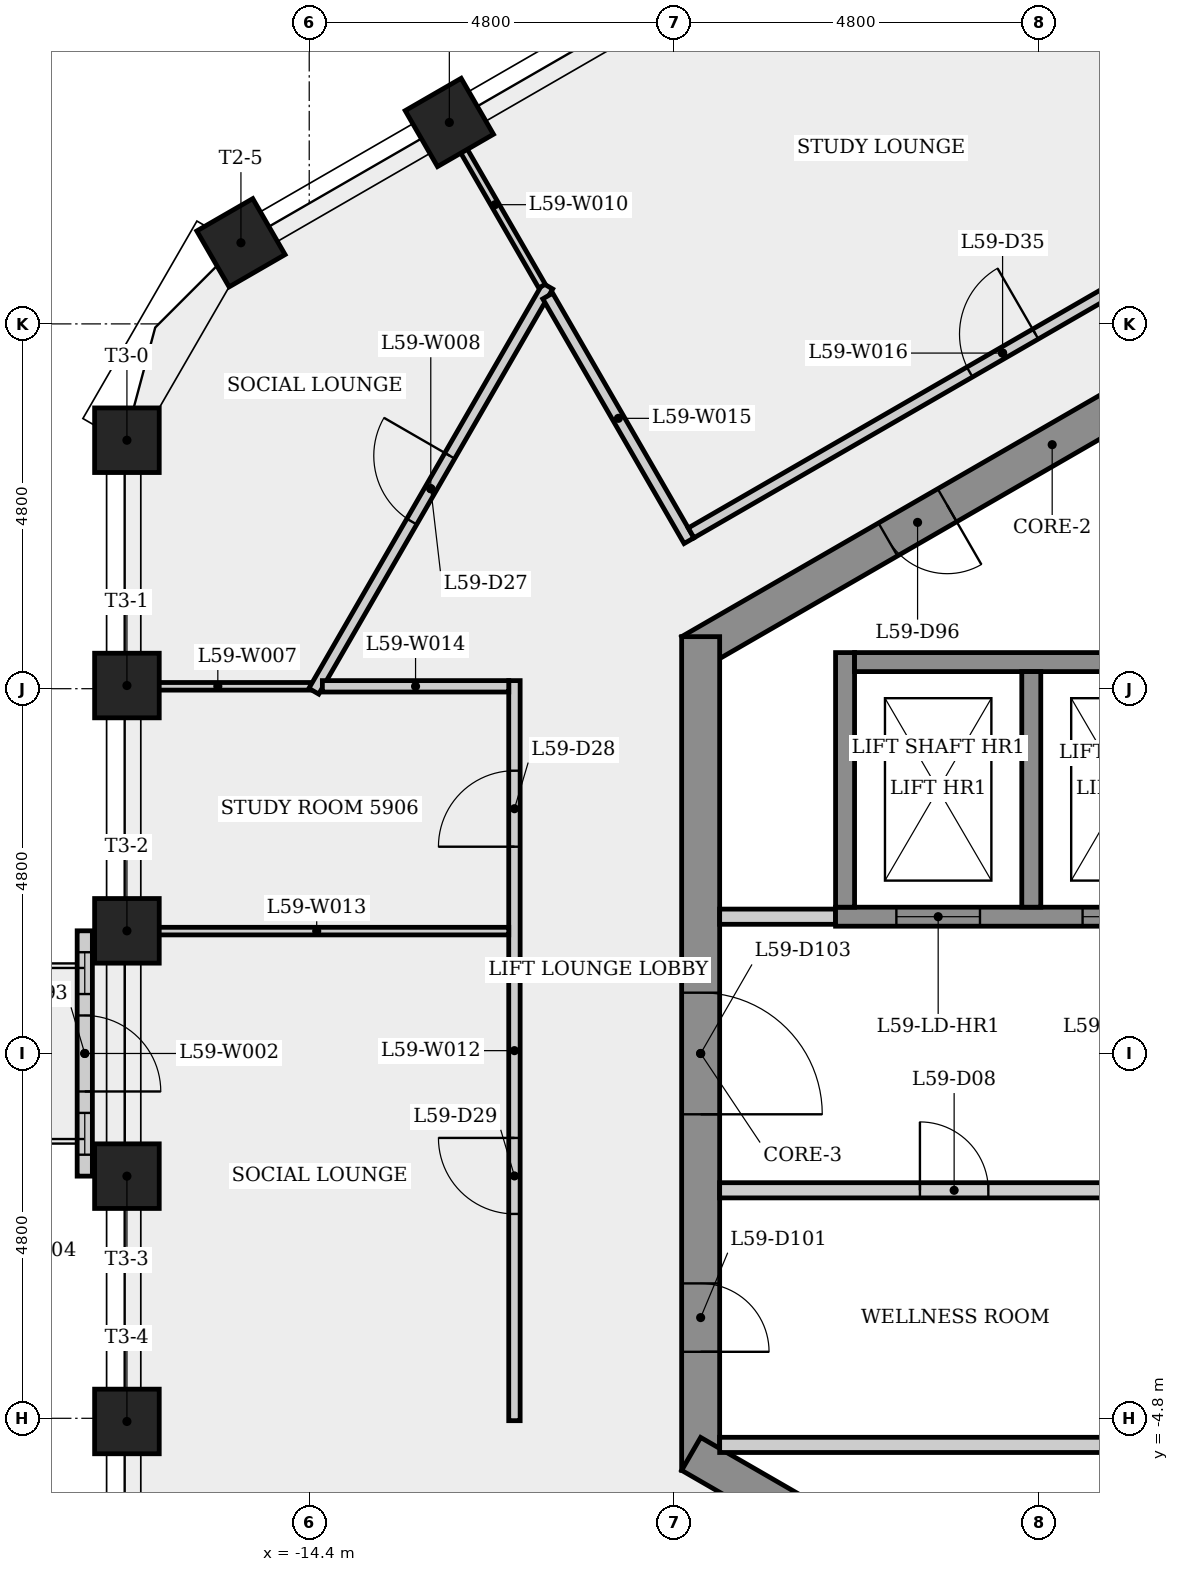
"""IFC4 building model, lengths in metres.
Left out: names, types, materials, properties, quantities, classifications, styles, units other than length and angle.
Written with IfcOpenShell. Run it as: python <this file> out.ifc"""

import sys

from ifc_helpers import new_model, si_unit, direction, frame, frame_2d, origin, origin_2d, place, context, subcontext, project, spatial, rectangle, extrude, element, fill, save


model = new_model("IFC4")
c1 = context("Model", 3, precision=1e-05, world=origin(), true_north=direction((0.0, 1.0)))
c2 = subcontext(c1, "Body", "Model", "MODEL_VIEW")
j1 = project(units=[si_unit("LENGTHUNIT", "METRE"), si_unit("PLANEANGLEUNIT", "RADIAN")], contexts=[c1])
p1 = place(None, origin())
s1 = spatial("IfcSite", under=j1, at=p1, CompositionType="ELEMENT")
p2 = place(p1, origin())
s2 = spatial("IfcBuilding", under=s1, at=p2, CompositionType="ELEMENT")
p3 = place(p2, frame((0.0, 0.0, 222.3)))
s3 = spatial("IfcBuildingStorey", under=s2, at=p3, CompositionType="ELEMENT", Elevation=222.3)
p4 = place(p3, frame((0.125, 10.753, 0.0), z_axis=(0.0, 0.0, 1.0), x_axis=(-0.866023993627, -0.500002442456, 0.0)))
e1 = element("IfcWall", 1, at=p4, inside=s3, PredefinedType="SHEAR", context=c2, shape_type="SweptSolid", body=[
    extrude(rectangle(XDim=10.97, YDim=0.5, at=frame_2d((5.485, 0.0))), origin(), (0.0, 0.0, 1.0), 3.4),
])
p5 = place(p4, frame((7.08, 0.0, 0.0)))
e2 = element("IfcOpeningElement", 2, at=p5, cuts=e1, PredefinedType="OPENING", context=c2, shape_type="SweptSolid", body=[
    extrude(rectangle(XDim=0.9, YDim=2.1, at=frame_2d((0.45, 1.05))), frame((0.0, 0.26, 0.0), z_axis=(0.0, -1.0, 0.0), x_axis=(1.0, 0.0, 0.0)), (0.0, 0.0, 1.0), 0.52),
])
p6 = place(p3, frame((-9.25, 5.485, 0.0), z_axis=(0.0, 0.0, 1.0), x_axis=(0.0, -1.0, 0.0)))
e3 = element("IfcWall", 3, at=p6, inside=s3, PredefinedType="SHEAR", context=c2, shape_type="SweptSolid", body=[
    extrude(rectangle(XDim=10.97, YDim=0.5, at=frame_2d((5.485, 0.0))), origin(), (0.0, 0.0, 1.0), 3.4),
])
p7 = place(p6, frame((8.51, 0.0, 0.0)))
e4 = element("IfcOpeningElement", 4, at=p7, cuts=e3, PredefinedType="OPENING", context=c2, shape_type="SweptSolid", body=[
    extrude(rectangle(XDim=0.9, YDim=2.1, at=frame_2d((0.45, 1.05))), frame((0.0, 0.26, 0.0), z_axis=(0.0, -1.0, 0.0), x_axis=(1.0, 0.0, 0.0)), (0.0, 0.0, 1.0), 0.52),
])
p8 = place(p6, frame((4.685, 0.0, 0.0)))
e5 = element("IfcOpeningElement", 5, at=p8, cuts=e3, PredefinedType="OPENING", context=c2, shape_type="SweptSolid", body=[
    extrude(rectangle(XDim=1.6, YDim=2.1, at=frame_2d((0.8, 1.05))), frame((0.0, 0.26, 0.0), z_axis=(0.0, -1.0, 0.0), x_axis=(1.0, 0.0, 0.0)), (0.0, 0.0, 1.0), 0.52),
])
p9 = place(p3, frame((-9.375, -5.268, 0.0), z_axis=(0.0, 0.0, 1.0), x_axis=(0.866023993627, -0.500002442456, 0.0)))
e6 = element("IfcWall", 6, at=p9, inside=s3, PredefinedType="SHEAR", context=c2, shape_type="SweptSolid", body=[
    extrude(rectangle(XDim=10.97, YDim=0.5, at=frame_2d((5.485, 0.0))), origin(), (0.0, 0.0, 1.0), 3.4),
])
p10 = place(p9, frame((3.857, 0.0, 0.0)))
e7 = element("IfcOpeningElement", 7, at=p10, cuts=e6, PredefinedType="OPENING", context=c2, shape_type="SweptSolid", body=[
    extrude(rectangle(XDim=0.9, YDim=2.1, at=frame_2d((0.45, 1.05))), frame((0.0, 0.26, 0.0), z_axis=(0.0, -1.0, 0.0), x_axis=(1.0, 0.0, 0.0)), (0.0, 0.0, 1.0), 0.52),
])
p11 = place(p9, frame((9.076, 0.0, 0.0)))
e8 = element("IfcOpeningElement", 8, at=p11, cuts=e6, PredefinedType="OPENING", context=c2, shape_type="SweptSolid", body=[
    extrude(rectangle(XDim=0.9, YDim=2.1, at=frame_2d((0.45, 1.05))), frame((0.0, 0.26, 0.0), z_axis=(0.0, -1.0, 0.0), x_axis=(1.0, 0.0, 0.0)), (0.0, 0.0, 1.0), 0.52),
])
for number, where, z_axis, x_axis in (
    (9, (-12.557, 12.25, 0.0), (0.0, 0.0, 1.0), (-0.5, 0.866, 0.0)),
    (10, (-15.299, 10.667, 0.0), (0.0, 0.0, 1.0), (-0.5, 0.866, 0.0)),
    (11, (-16.799, 8.069, 0.0), (0.0, 0.0, 1.0), (-1.0, 0.0, 0.0)),
    (12, (-16.799, 4.842, 0.0), (0.0, 0.0, 1.0), (-1.0, 0.0, 0.0)),
    (13, (-16.799, 1.614, 0.0), (0.0, 0.0, 1.0), (-1.0, 0.0, 0.0)),
    (14, (-16.799, -1.614, 0.0), (0.0, 0.0, 1.0), (-1.0, 0.0, 0.0)),
    (15, (-16.799, -4.842, 0.0), (0.0, 0.0, 1.0), (-1.0, 0.0, 0.0)),
):
    element("IfcColumn", number, at=place(p3, frame(where, z_axis=z_axis, x_axis=x_axis)), inside=s3, PredefinedType="COLUMN", context=c2, shape_type="SweptSolid", body=[
        extrude(rectangle(XDim=0.85, YDim=0.85, at=origin_2d()), origin(), (0.0, 0.0, 1.0), 3.4),
    ])
p12 = place(p3, frame((-17.353, 1.614, 0.0), z_axis=(0.0, 0.0, 1.0), x_axis=(0.0, -1.0, 0.0)))
e16 = element("IfcWall", 16, at=p12, inside=s3, PredefinedType="SOLIDWALL", context=c2, shape_type="SweptSolid", body=[
    extrude(rectangle(XDim=3.228, YDim=0.2, at=frame_2d((1.614, 0.0))), origin(), (0.0, 0.0, 1.0), 3.4),
])
p13 = place(p12, frame((1.114, 0.0, 0.0)))
e17 = element("IfcOpeningElement", 17, at=p13, cuts=e16, PredefinedType="OPENING", context=c2, shape_type="SweptSolid", body=[
    extrude(rectangle(XDim=1.0, YDim=2.4, at=frame_2d((0.5, 1.2))), frame((0.0, 0.11, 0.0), z_axis=(0.0, -1.0, 0.0), x_axis=(1.0, 0.0, 0.0)), (0.0, 0.0, 1.0), 0.22),
])
p14 = place(p12, frame((0.282, 0.0, 0.9)))
e18 = element("IfcOpeningElement", 18, at=p14, cuts=e16, PredefinedType="OPENING", context=c2, shape_type="SweptSolid", body=[
    extrude(rectangle(XDim=0.55, YDim=1.5, at=frame_2d((0.275, 0.75))), frame((0.0, 0.11, 0.0), z_axis=(0.0, -1.0, 0.0), x_axis=(1.0, 0.0, 0.0)), (0.0, 0.0, 1.0), 0.22),
])
p15 = place(p12, frame((2.396, 0.0, 0.9)))
e19 = element("IfcOpeningElement", 19, at=p15, cuts=e16, PredefinedType="OPENING", context=c2, shape_type="SweptSolid", body=[
    extrude(rectangle(XDim=0.55, YDim=1.5, at=frame_2d((0.275, 0.75))), frame((0.0, 0.11, 0.0), z_axis=(0.0, -1.0, 0.0), x_axis=(1.0, 0.0, 0.0)), (0.0, 0.0, 1.0), 0.22),
])
p16 = place(p3, frame((-14.377, 4.831, 0.0), z_axis=(0.0, 0.0, 1.0), x_axis=(-1.0, 0.0, 0.0)))
e20 = element("IfcWall", 20, at=p16, inside=s3, PredefinedType="PARTITIONING", context=c2, shape_type="SweptSolid", body=[
    extrude(rectangle(XDim=2.451, YDim=0.1, at=frame_2d((1.226, 0.0))), origin(), (0.0, 0.0, 1.0), 3.05),
])
p17 = place(p3, frame((-14.34, 4.766, 0.0), z_axis=(0.0, 0.0, 1.0), x_axis=(0.500003992843, 0.866023098503, 0.0)))
e21 = element("IfcWall", 21, at=p17, inside=s3, PredefinedType="PARTITIONING", context=c2, shape_type="SweptSolid", body=[
    extrude(rectangle(XDim=6.155, YDim=0.15, at=frame_2d((3.078, 0.0))), origin(), (0.0, 0.0, 1.0), 3.05),
])
p18 = place(p17, frame((2.578, 0.0, 0.0)))
e22 = element("IfcOpeningElement", 22, at=p18, cuts=e21, PredefinedType="OPENING", context=c2, shape_type="SweptSolid", body=[
    extrude(rectangle(XDim=1.0, YDim=2.1, at=frame_2d((0.5, 1.05))), frame((0.0, 0.085, 0.0), z_axis=(0.0, -1.0, 0.0), x_axis=(1.0, 0.0, 0.0)), (0.0, 0.0, 1.0), 0.17),
])
p19 = place(p3, frame((-12.574, 12.24, 0.0), z_axis=(0.0, 0.0, 1.0), x_axis=(0.500032699561, -0.866006523861, 0.0)))
e23 = element("IfcWall", 23, at=p19, inside=s3, PredefinedType="PARTITIONING", context=c2, shape_type="SweptSolid", body=[
    extrude(rectangle(XDim=2.475, YDim=0.1, at=frame_2d((1.237, 0.0))), origin(), (0.0, 0.0, 1.0), 3.05),
])
p20 = place(p3, frame((-11.7, -4.831, 0.0), z_axis=(0.0, 0.0, 1.0), x_axis=(0.0, 1.0, 0.0)))
e24 = element("IfcWall", 24, at=p20, inside=s3, PredefinedType="PARTITIONING", context=c2, shape_type="SweptSolid", body=[
    extrude(rectangle(XDim=9.738, YDim=0.15, at=frame_2d((4.869, 0.0))), origin(), (0.0, 0.0, 1.0), 3.05),
])
p21 = place(p20, frame((7.552, 0.0, 0.0)))
e25 = element("IfcOpeningElement", 25, at=p21, cuts=e24, PredefinedType="OPENING", context=c2, shape_type="SweptSolid", body=[
    extrude(rectangle(XDim=1.0, YDim=2.1, at=frame_2d((0.5, 1.05))), frame((0.0, 0.085, 0.0), z_axis=(0.0, -1.0, 0.0), x_axis=(1.0, 0.0, 0.0)), (0.0, 0.0, 1.0), 0.17),
])
p22 = place(p20, frame((2.72, 0.0, 0.0)))
e26 = element("IfcOpeningElement", 26, at=p22, cuts=e24, PredefinedType="OPENING", context=c2, shape_type="SweptSolid", body=[
    extrude(rectangle(XDim=1.0, YDim=2.1, at=frame_2d((0.5, 1.05))), frame((0.0, 0.085, 0.0), z_axis=(0.0, -1.0, 0.0), x_axis=(1.0, 0.0, 0.0)), (0.0, 0.0, 1.0), 0.17),
])
p23 = place(p3, frame((-11.775, 1.61, 0.0), z_axis=(0.0, 0.0, 1.0), x_axis=(-1.0, 0.0, 0.0)))
e27 = element("IfcWall", 27, at=p23, inside=s3, PredefinedType="PARTITIONING", context=c2, shape_type="SweptSolid", body=[
    extrude(rectangle(XDim=5.053, YDim=0.1, at=frame_2d((2.527, 0.0))), origin(), (0.0, 0.0, 1.0), 3.05),
])
p24 = place(p3, frame((-11.775, 4.831, 0.0), z_axis=(0.0, 0.0, 1.0), x_axis=(-1.0, 0.0, 0.0)))
e28 = element("IfcWall", 28, at=p24, inside=s3, PredefinedType="PARTITIONING", context=c2, shape_type="SweptSolid", body=[
    extrude(rectangle(XDim=2.452, YDim=0.15, at=frame_2d((1.226, 0.0))), origin(), (0.0, 0.0, 1.0), 3.05),
])
p25 = place(p3, frame((-11.262, 9.967, 0.0), z_axis=(0.0, 0.0, 1.0), x_axis=(0.499995303914, -0.866028115054, 0.0)))
e29 = element("IfcWall", 29, at=p25, inside=s3, PredefinedType="PARTITIONING", context=c2, shape_type="SweptSolid", body=[
    extrude(rectangle(XDim=3.718, YDim=0.15, at=frame_2d((1.859, 0.0))), origin(), (0.0, 0.0, 1.0), 3.05),
])
p26 = place(p3, frame((-9.376, 6.85, 0.0), z_axis=(0.0, 0.0, 1.0), x_axis=(0.866029654818, 0.499992636921, 0.0)))
e30 = element("IfcWall", 30, at=p26, inside=s3, PredefinedType="PARTITIONING", context=c2, shape_type="SweptSolid", body=[
    extrude(rectangle(XDim=9.465, YDim=0.15, at=frame_2d((4.732, 0.0))), origin(), (0.0, 0.0, 1.0), 3.05),
])
p27 = place(p26, frame((4.232, 0.0, 0.0)))
e31 = element("IfcOpeningElement", 31, at=p27, cuts=e30, PredefinedType="OPENING", context=c2, shape_type="SweptSolid", body=[
    extrude(rectangle(XDim=1.0, YDim=2.1, at=frame_2d((0.5, 1.05))), frame((0.0, 0.085, 0.0), z_axis=(0.0, -1.0, 0.0), x_axis=(1.0, 0.0, 0.0)), (0.0, 0.0, 1.0), 0.17),
])
p28 = place(p3, frame((-9.0, 1.8, 0.0), z_axis=(0.0, 0.0, 1.0), x_axis=(1.0, 0.0, 0.0)))
e32 = element("IfcWall", 32, at=p28, inside=s3, PredefinedType="PARTITIONING", context=c2, shape_type="SweptSolid", body=[
    extrude(rectangle(XDim=1.525, YDim=0.2, at=frame_2d((0.763, 0.0))), origin(), (0.0, 0.0, 1.0), 3.05),
])
p29 = place(p3, frame((-9.0, -5.15, 0.0), z_axis=(0.0, 0.0, 1.0), x_axis=(1.0, 0.0, 0.0)))
e33 = element("IfcWall", 33, at=p29, inside=s3, PredefinedType="PARTITIONING", context=c2, shape_type="SweptSolid", body=[
    extrude(rectangle(XDim=11.325, YDim=0.2, at=frame_2d((5.663, 0.0))), origin(), (0.0, 0.0, 1.0), 3.05),
])
p30 = place(p3, frame((-7.475, 1.8, 0.0), z_axis=(0.0, 0.0, 1.0), x_axis=(1.0, 0.0, 0.0)))
e34 = element("IfcWall", 34, at=p30, inside=s3, PredefinedType="SHEAR", context=c2, shape_type="SweptSolid", body=[
    extrude(rectangle(XDim=14.95, YDim=0.25, at=frame_2d((7.475, 0.0))), origin(), (0.0, 0.0, 1.0), 3.05),
])
p31 = place(p30, frame((0.8, 0.0, 0.0)))
e35 = element("IfcOpeningElement", 35, at=p31, cuts=e34, PredefinedType="OPENING", context=c2, shape_type="SweptSolid", body=[
    extrude(rectangle(XDim=1.1, YDim=2.1, at=frame_2d((0.55, 1.05))), frame((0.0, 0.135, 0.0), z_axis=(0.0, -1.0, 0.0), x_axis=(1.0, 0.0, 0.0)), (0.0, 0.0, 1.0), 0.27),
])
p32 = place(p30, frame((3.25, 0.0, 0.0)))
e36 = element("IfcOpeningElement", 36, at=p32, cuts=e34, PredefinedType="OPENING", context=c2, shape_type="SweptSolid", body=[
    extrude(rectangle(XDim=1.1, YDim=2.1, at=frame_2d((0.55, 1.05))), frame((0.0, 0.135, 0.0), z_axis=(0.0, -1.0, 0.0), x_axis=(1.0, 0.0, 0.0)), (0.0, 0.0, 1.0), 0.27),
])
p33 = place(p30, frame((5.7, 0.0, 0.0)))
e37 = element("IfcOpeningElement", 37, at=p33, cuts=e34, PredefinedType="OPENING", context=c2, shape_type="SweptSolid", body=[
    extrude(rectangle(XDim=1.1, YDim=2.1, at=frame_2d((0.55, 1.05))), frame((0.0, 0.135, 0.0), z_axis=(0.0, -1.0, 0.0), x_axis=(1.0, 0.0, 0.0)), (0.0, 0.0, 1.0), 0.27),
])
p34 = place(p30, frame((8.15, 0.0, 0.0)))
e38 = element("IfcOpeningElement", 38, at=p34, cuts=e34, PredefinedType="OPENING", context=c2, shape_type="SweptSolid", body=[
    extrude(rectangle(XDim=1.1, YDim=2.1, at=frame_2d((0.55, 1.05))), frame((0.0, 0.135, 0.0), z_axis=(0.0, -1.0, 0.0), x_axis=(1.0, 0.0, 0.0)), (0.0, 0.0, 1.0), 0.27),
])
p35 = place(p30, frame((10.6, 0.0, 0.0)))
e39 = element("IfcOpeningElement", 39, at=p35, cuts=e34, PredefinedType="OPENING", context=c2, shape_type="SweptSolid", body=[
    extrude(rectangle(XDim=1.1, YDim=2.1, at=frame_2d((0.55, 1.05))), frame((0.0, 0.135, 0.0), z_axis=(0.0, -1.0, 0.0), x_axis=(1.0, 0.0, 0.0)), (0.0, 0.0, 1.0), 0.27),
])
p36 = place(p30, frame((13.05, 0.0, 0.0)))
e40 = element("IfcOpeningElement", 40, at=p36, cuts=e34, PredefinedType="OPENING", context=c2, shape_type="SweptSolid", body=[
    extrude(rectangle(XDim=1.1, YDim=2.1, at=frame_2d((0.55, 1.05))), frame((0.0, 0.135, 0.0), z_axis=(0.0, -1.0, 0.0), x_axis=(1.0, 0.0, 0.0)), (0.0, 0.0, 1.0), 0.27),
])
p37 = place(p3, frame((-7.35, 1.925, 0.0), z_axis=(0.0, 0.0, 1.0), x_axis=(0.0, 1.0, 0.0)))
e41 = element("IfcWall", 41, at=p37, inside=s3, PredefinedType="SHEAR", context=c2, shape_type="SweptSolid", body=[
    extrude(rectangle(XDim=3.35, YDim=0.25, at=frame_2d((1.675, 0.0))), origin(), (0.0, 0.0, 1.0), 3.05),
])
p38 = place(p3, frame((-7.225, 5.15, 0.0), z_axis=(0.0, 0.0, 1.0), x_axis=(1.0, 0.0, 0.0)))
e42 = element("IfcWall", 42, at=p38, inside=s3, PredefinedType="SHEAR", context=c2, shape_type="SweptSolid", body=[
    extrude(rectangle(XDim=14.7, YDim=0.25, at=frame_2d((7.35, 0.0))), origin(), (0.0, 0.0, 1.0), 3.05),
])
p39 = place(p3, frame((-4.9, 5.025, 0.0), z_axis=(0.0, 0.0, 1.0), x_axis=(0.0, -1.0, 0.0)))
e43 = element("IfcWall", 43, at=p39, inside=s3, PredefinedType="SHEAR", context=c2, shape_type="SweptSolid", body=[
    extrude(rectangle(XDim=3.1, YDim=0.25, at=frame_2d((1.55, 0.0))), origin(), (0.0, 0.0, 1.0), 3.4),
])
p40 = place(p3, frame((-9.0, -1.8, 0.0), z_axis=(0.0, 0.0, 1.0), x_axis=(1.0, 0.0, 0.0)))
e44 = element("IfcWall", 44, at=p40, inside=s3, PredefinedType="PARTITIONING", context=c2, shape_type="SweptSolid", body=[
    extrude(rectangle(XDim=11.325, YDim=0.2, at=frame_2d((5.663, 0.0))), origin(), (0.0, 0.0, 1.0), 3.05),
])
p41 = place(p40, frame((2.635, 0.0, 0.0)))
e45 = element("IfcOpeningElement", 45, at=p41, cuts=e44, PredefinedType="OPENING", context=c2, shape_type="SweptSolid", body=[
    extrude(rectangle(XDim=0.9, YDim=2.1, at=frame_2d((0.45, 1.05))), frame((0.0, 0.11, 0.0), z_axis=(0.0, -1.0, 0.0), x_axis=(1.0, 0.0, 0.0)), (0.0, 0.0, 1.0), 0.22),
])
p42 = place(p40, frame((8.488, 0.0, 0.0)))
e46 = element("IfcOpeningElement", 46, at=p42, cuts=e44, PredefinedType="OPENING", context=c2, shape_type="SweptSolid", body=[
    extrude(rectangle(XDim=0.9, YDim=2.1, at=frame_2d((0.45, 1.05))), frame((0.0, 0.11, 0.0), z_axis=(0.0, -1.0, 0.0), x_axis=(1.0, 0.0, 0.0)), (0.0, 0.0, 1.0), 0.22),
])
p43 = place(p13, origin())
e47 = element("IfcDoor", 47, at=p43, inside=s3, OperationType="SINGLE_SWING_RIGHT", PredefinedType="DOOR", context=c2, shape_type="SweptSolid", body=[
    extrude(rectangle(XDim=1.0, YDim=2.4, at=frame_2d((0.5, 1.2))), frame((0.0, 0.025, 0.0), z_axis=(0.0, -1.0, 0.0), x_axis=(1.0, 0.0, 0.0)), (0.0, 0.0, 1.0), 0.05),
])
fill(e17, e47)
p44 = place(p14, origin())
e48 = element("IfcWindow", 48, at=p44, inside=s3, PartitioningType="SINGLE_PANEL", PredefinedType="WINDOW", context=c2, shape_type="SweptSolid", body=[
    extrude(rectangle(XDim=0.55, YDim=1.5, at=frame_2d((0.275, 0.75))), frame((0.0, 0.03, 0.0), z_axis=(0.0, -1.0, 0.0), x_axis=(1.0, 0.0, 0.0)), (0.0, 0.0, 1.0), 0.06),
])
fill(e18, e48)
p45 = place(p15, origin())
e49 = element("IfcWindow", 49, at=p45, inside=s3, PartitioningType="SINGLE_PANEL", PredefinedType="WINDOW", context=c2, shape_type="SweptSolid", body=[
    extrude(rectangle(XDim=0.55, YDim=1.5, at=frame_2d((0.275, 0.75))), frame((0.0, 0.03, 0.0), z_axis=(0.0, -1.0, 0.0), x_axis=(1.0, 0.0, 0.0)), (0.0, 0.0, 1.0), 0.06),
])
fill(e19, e49)
p46 = place(p31, origin())
e50 = element("IfcDoor", 50, at=p46, inside=s3, OperationType="SLIDING_TO_LEFT", PredefinedType="DOOR", context=c2, shape_type="SweptSolid", body=[
    extrude(rectangle(XDim=1.1, YDim=2.1, at=frame_2d((0.55, 1.05))), frame((0.0, 0.025, 0.0), z_axis=(0.0, -1.0, 0.0), x_axis=(1.0, 0.0, 0.0)), (0.0, 0.0, 1.0), 0.05),
])
fill(e35, e50)
p47 = place(p32, origin())
e51 = element("IfcDoor", 51, at=p47, inside=s3, OperationType="SLIDING_TO_LEFT", PredefinedType="DOOR", context=c2, shape_type="SweptSolid", body=[
    extrude(rectangle(XDim=1.1, YDim=2.1, at=frame_2d((0.55, 1.05))), frame((0.0, 0.025, 0.0), z_axis=(0.0, -1.0, 0.0), x_axis=(1.0, 0.0, 0.0)), (0.0, 0.0, 1.0), 0.05),
])
fill(e36, e51)
p48 = place(p41, origin())
e52 = element("IfcDoor", 52, at=p48, inside=s3, OperationType="SINGLE_SWING_LEFT", PredefinedType="DOOR", context=c2, shape_type="SweptSolid", body=[
    extrude(rectangle(XDim=0.9, YDim=2.1, at=frame_2d((0.45, 1.05))), frame((0.0, 0.025, 0.0), z_axis=(0.0, -1.0, 0.0), x_axis=(1.0, 0.0, 0.0)), (0.0, 0.0, 1.0), 0.05),
])
fill(e45, e52)
p49 = place(p18, origin())
e53 = element("IfcDoor", 53, at=p49, inside=s3, OperationType="SINGLE_SWING_RIGHT", PredefinedType="DOOR", context=c2, shape_type="SweptSolid", body=[
    extrude(rectangle(XDim=1.0, YDim=2.1, at=frame_2d((0.5, 1.05))), frame((0.0, 0.025, 0.0), z_axis=(0.0, -1.0, 0.0), x_axis=(1.0, 0.0, 0.0)), (0.0, 0.0, 1.0), 0.05),
])
fill(e22, e53)
p50 = place(p21, origin())
e54 = element("IfcDoor", 54, at=p50, inside=s3, OperationType="SINGLE_SWING_LEFT", PredefinedType="DOOR", context=c2, shape_type="SweptSolid", body=[
    extrude(rectangle(XDim=1.0, YDim=2.1, at=frame_2d((0.5, 1.05))), frame((0.0, 0.025, 0.0), z_axis=(0.0, -1.0, 0.0), x_axis=(1.0, 0.0, 0.0)), (0.0, 0.0, 1.0), 0.05),
])
fill(e25, e54)
p51 = place(p22, origin())
e55 = element("IfcDoor", 55, at=p51, inside=s3, OperationType="SINGLE_SWING_RIGHT", PredefinedType="DOOR", context=c2, shape_type="SweptSolid", body=[
    extrude(rectangle(XDim=1.0, YDim=2.1, at=frame_2d((0.5, 1.05))), frame((0.0, 0.025, 0.0), z_axis=(0.0, -1.0, 0.0), x_axis=(1.0, 0.0, 0.0)), (0.0, 0.0, 1.0), 0.05),
])
fill(e26, e55)
p52 = place(p27, origin())
e56 = element("IfcDoor", 56, at=p52, inside=s3, OperationType="SINGLE_SWING_RIGHT", PredefinedType="DOOR", context=c2, shape_type="SweptSolid", body=[
    extrude(rectangle(XDim=1.0, YDim=2.1, at=frame_2d((0.5, 1.05))), frame((0.0, 0.025, 0.0), z_axis=(0.0, -1.0, 0.0), x_axis=(1.0, 0.0, 0.0)), (0.0, 0.0, 1.0), 0.05),
])
fill(e31, e56)
p53 = place(p5, origin())
e57 = element("IfcDoor", 57, at=p53, inside=s3, OperationType="SINGLE_SWING_LEFT", PredefinedType="DOOR", context=c2, shape_type="SweptSolid", body=[
    extrude(rectangle(XDim=0.9, YDim=2.1, at=frame_2d((0.45, 1.05))), frame((0.0, 0.025, 0.0), z_axis=(0.0, -1.0, 0.0), x_axis=(1.0, 0.0, 0.0)), (0.0, 0.0, 1.0), 0.05),
])
fill(e2, e57)
p54 = place(p7, origin())
e58 = element("IfcDoor", 58, at=p54, inside=s3, OperationType="SINGLE_SWING_RIGHT", PredefinedType="DOOR", context=c2, shape_type="SweptSolid", body=[
    extrude(rectangle(XDim=0.9, YDim=2.1, at=frame_2d((0.45, 1.05))), frame((0.0, 0.025, 0.0), z_axis=(0.0, -1.0, 0.0), x_axis=(1.0, 0.0, 0.0)), (0.0, 0.0, 1.0), 0.05),
])
fill(e4, e58)
p55 = place(p8, origin())
e59 = element("IfcDoor", 59, at=p55, inside=s3, OperationType="SINGLE_SWING_RIGHT", PredefinedType="DOOR", context=c2, shape_type="SweptSolid", body=[
    extrude(rectangle(XDim=1.6, YDim=2.1, at=frame_2d((0.8, 1.05))), frame((0.0, 0.025, 0.0), z_axis=(0.0, -1.0, 0.0), x_axis=(1.0, 0.0, 0.0)), (0.0, 0.0, 1.0), 0.05),
])
fill(e5, e59)
save(model, sys.argv[1])
